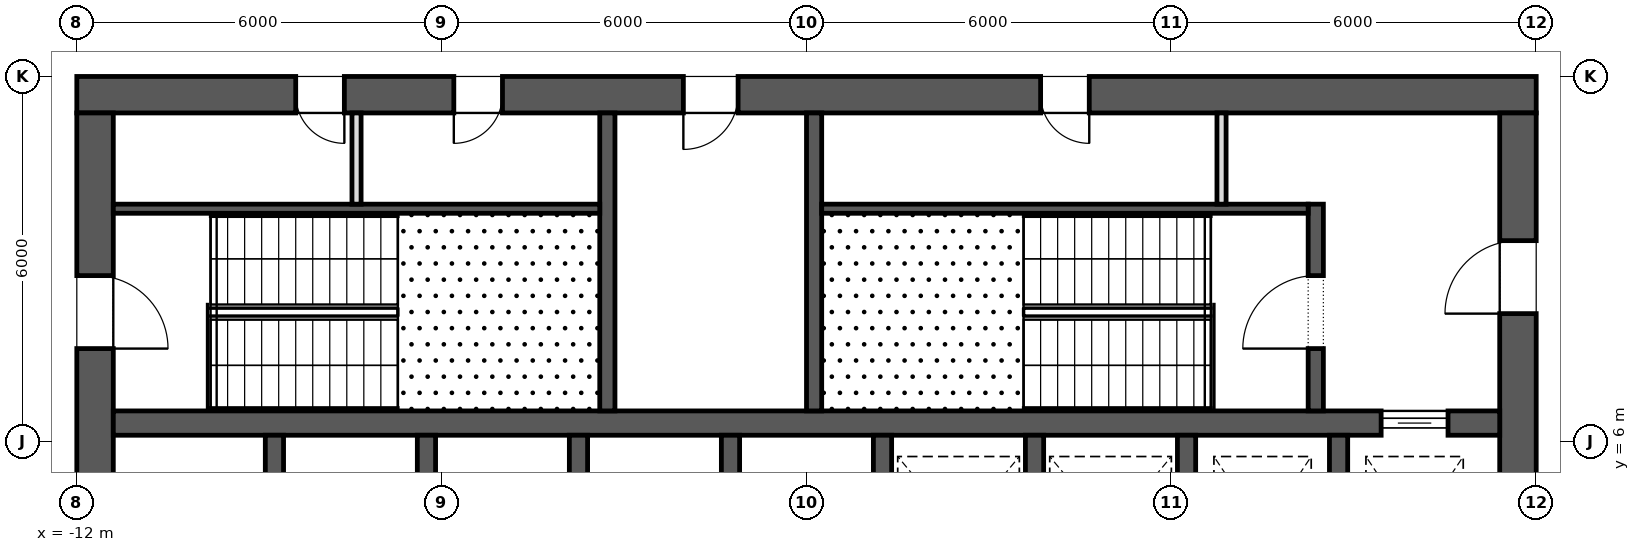
"""IFC4 building model, lengths in metres.
Left out: names, types, materials, properties, quantities, classifications, styles, units other than length and angle.
Written with IfcOpenShell. Run it as: python <this file> out.ifc"""

import sys

from ifc_helpers import new_model, si_unit, direction, frame, frame_2d, origin, place, context, subcontext, project, spatial, rectangle, extrude, element, fill, save


model = new_model("IFC4")
c1 = context("Model", 3, precision=1e-05, world=origin(), true_north=direction((0.0, 1.0)))
c2 = subcontext(c1, "Body", "Model", "MODEL_VIEW")
j1 = project(units=[si_unit("LENGTHUNIT", "METRE"), si_unit("PLANEANGLEUNIT", "RADIAN")], contexts=[c1])
p1 = place(None, origin())
s1 = spatial("IfcSite", under=j1, at=p1, CompositionType="ELEMENT")
p2 = place(p1, origin())
s2 = spatial("IfcBuilding", under=s1, at=p2, CompositionType="ELEMENT")
p3 = place(p2, frame((0.0, 0.0, 27.7)))
s3 = spatial("IfcBuildingStorey", under=s2, at=p3, CompositionType="ELEMENT", Elevation=27.7)
p4 = place(p3, frame((-12.0, 11.7, 0.0), z_axis=(0.0, 0.0, 1.0), x_axis=(1.0, 0.0, 0.0)))
e1 = element("IfcWall", 1, at=p4, inside=s3, PredefinedType="SHEAR", context=c2, shape_type="SweptSolid", body=[
    extrude(rectangle(XDim=24.0, YDim=0.6, at=frame_2d((12.0, 0.0))), origin(), (0.0, 0.0, 1.0), 4.2),
])
p5 = place(p4, frame((9.975, 0.0, 0.0)))
e2 = element("IfcOpeningElement", 2, at=p5, cuts=e1, PredefinedType="OPENING", context=c2, shape_type="SweptSolid", body=[
    extrude(rectangle(XDim=0.9, YDim=2.1, at=frame_2d((0.45, 1.05))), frame((0.0, 0.312, 0.0), z_axis=(0.0, -1.0, 0.0), x_axis=(1.0, 0.0, 0.0)), (0.0, 0.0, 1.0), 0.624),
])
p6 = place(p4, frame((3.6, 0.0, 0.0)))
e3 = element("IfcOpeningElement", 3, at=p6, cuts=e1, PredefinedType="OPENING", context=c2, shape_type="SweptSolid", body=[
    extrude(rectangle(XDim=0.8, YDim=2.1, at=frame_2d((0.4, 1.05))), frame((0.0, 0.312, 0.0), z_axis=(0.0, -1.0, 0.0), x_axis=(1.0, 0.0, 0.0)), (0.0, 0.0, 1.0), 0.624),
])
p7 = place(p4, frame((6.2, 0.0, 0.0)))
e4 = element("IfcOpeningElement", 4, at=p7, cuts=e1, PredefinedType="OPENING", context=c2, shape_type="SweptSolid", body=[
    extrude(rectangle(XDim=0.8, YDim=2.1, at=frame_2d((0.4, 1.05))), frame((0.0, 0.312, 0.0), z_axis=(0.0, -1.0, 0.0), x_axis=(1.0, 0.0, 0.0)), (0.0, 0.0, 1.0), 0.624),
])
p8 = place(p4, frame((15.85, 0.0, 0.0)))
e5 = element("IfcOpeningElement", 5, at=p8, cuts=e1, PredefinedType="OPENING", context=c2, shape_type="SweptSolid", body=[
    extrude(rectangle(XDim=0.8, YDim=2.1, at=frame_2d((0.4, 1.05))), frame((0.0, 0.312, 0.0), z_axis=(0.0, -1.0, 0.0), x_axis=(1.0, 0.0, 0.0)), (0.0, 0.0, 1.0), 0.624),
])
p9 = place(p3, frame((11.7, -11.4, 0.0), z_axis=(0.0, 0.0, 1.0), x_axis=(0.0, 1.0, 0.0)))
e6 = element("IfcWall", 6, at=p9, inside=s3, PredefinedType="SHEAR", context=c2, shape_type="SweptSolid", body=[
    extrude(rectangle(XDim=22.8, YDim=0.6, at=frame_2d((11.4, 0.0))), origin(), (0.0, 0.0, 1.0), 4.2),
])
p10 = place(p9, frame((10.2, 0.0, 0.0)))
e7 = element("IfcOpeningElement", 7, at=p10, cuts=e6, PredefinedType="OPENING", context=c2, shape_type="SweptSolid", body=[
    extrude(rectangle(XDim=2.4, YDim=2.1, at=frame_2d((1.2, 1.05))), frame((0.0, 0.312, 0.0), z_axis=(0.0, -1.0, 0.0), x_axis=(1.0, 0.0, 0.0)), (0.0, 0.0, 1.0), 0.624),
])
p11 = place(p9, frame((19.5, 0.0, 0.0)))
e8 = element("IfcOpeningElement", 8, at=p11, cuts=e6, PredefinedType="OPENING", context=c2, shape_type="SweptSolid", body=[
    extrude(rectangle(XDim=1.2, YDim=2.1, at=frame_2d((0.6, 1.05))), frame((0.0, 0.312, 0.0), z_axis=(0.0, -1.0, 0.0), x_axis=(1.0, 0.0, 0.0)), (0.0, 0.0, 1.0), 0.624),
])
p12 = place(p9, frame((2.1, 0.0, 0.0)))
e9 = element("IfcOpeningElement", 9, at=p12, cuts=e6, PredefinedType="OPENING", context=c2, shape_type="SweptSolid", body=[
    extrude(rectangle(XDim=1.2, YDim=2.1, at=frame_2d((0.6, 1.05))), frame((0.0, 0.312, 0.0), z_axis=(0.0, -1.0, 0.0), x_axis=(1.0, 0.0, 0.0)), (0.0, 0.0, 1.0), 0.624),
])
p13 = place(p3, frame((-11.7, -11.4, 0.0), z_axis=(0.0, 0.0, 1.0), x_axis=(0.0, 1.0, 0.0)))
e10 = element("IfcWall", 10, at=p13, inside=s3, PredefinedType="SHEAR", context=c2, shape_type="SweptSolid", body=[
    extrude(rectangle(XDim=22.8, YDim=0.6, at=frame_2d((11.4, 0.0))), origin(), (0.0, 0.0, 1.0), 4.2),
])
p14 = place(p13, frame((10.2, 0.0, 0.0)))
e11 = element("IfcOpeningElement", 11, at=p14, cuts=e10, PredefinedType="OPENING", context=c2, shape_type="SweptSolid", body=[
    extrude(rectangle(XDim=2.4, YDim=2.1, at=frame_2d((1.2, 1.05))), frame((0.0, 0.312, 0.0), z_axis=(0.0, -1.0, 0.0), x_axis=(1.0, 0.0, 0.0)), (0.0, 0.0, 1.0), 0.624),
])
p15 = place(p13, frame((18.925, 0.0, 0.0)))
e12 = element("IfcOpeningElement", 12, at=p15, cuts=e10, PredefinedType="OPENING", context=c2, shape_type="SweptSolid", body=[
    extrude(rectangle(XDim=1.2, YDim=2.1, at=frame_2d((0.6, 1.05))), frame((0.0, 0.312, 0.0), z_axis=(0.0, -1.0, 0.0), x_axis=(1.0, 0.0, 0.0)), (0.0, 0.0, 1.0), 0.624),
])
p16 = place(p13, frame((2.675, 0.0, 0.0)))
e13 = element("IfcOpeningElement", 13, at=p16, cuts=e10, PredefinedType="OPENING", context=c2, shape_type="SweptSolid", body=[
    extrude(rectangle(XDim=1.2, YDim=2.1, at=frame_2d((0.6, 1.05))), frame((0.0, 0.312, 0.0), z_axis=(0.0, -1.0, 0.0), x_axis=(1.0, 0.0, 0.0)), (0.0, 0.0, 1.0), 0.624),
])
p17 = place(p3, frame((-11.4, 6.3, 0.0), z_axis=(0.0, 0.0, 1.0), x_axis=(1.0, 0.0, 0.0)))
e14 = element("IfcWall", 14, at=p17, inside=s3, PredefinedType="SHEAR", context=c2, shape_type="SweptSolid", body=[
    extrude(rectangle(XDim=22.8, YDim=0.4, at=frame_2d((11.4, 0.0))), origin(), (0.0, 0.0, 1.0), 4.2),
])
p18 = place(p17, frame((20.85, 0.0, 0.0)))
e15 = element("IfcOpeningElement", 15, at=p18, cuts=e14, PredefinedType="OPENING", context=c2, shape_type="SweptSolid", body=[
    extrude(rectangle(XDim=1.1, YDim=2.1, at=frame_2d((0.55, 1.05))), frame((0.0, 0.212, 0.0), z_axis=(0.0, -1.0, 0.0), x_axis=(1.0, 0.0, 0.0)), (0.0, 0.0, 1.0), 0.424),
])
for number, where, z_axis, x_axis in (
    (16, (-8.75, 3.2, 0.0), (0.0, 0.0, 1.0), (0.0, 1.0, 0.0)),
    (17, (-6.25, 3.2, 0.0), (0.0, 0.0, 1.0), (0.0, 1.0, 0.0)),
    (18, (-3.75, 3.2, 0.0), (0.0, 0.0, 1.0), (0.0, 1.0, 0.0)),
    (19, (-1.25, 3.2, 0.0), (0.0, 0.0, 1.0), (0.0, 1.0, 0.0)),
    (20, (1.25, 3.2, 0.0), (0.0, 0.0, 1.0), (0.0, 1.0, 0.0)),
    (21, (3.75, 3.2, 0.0), (0.0, 0.0, 1.0), (0.0, 1.0, 0.0)),
    (22, (6.25, 3.2, 0.0), (0.0, 0.0, 1.0), (0.0, 1.0, 0.0)),
    (23, (8.75, 3.2, 0.0), (0.0, 0.0, 1.0), (0.0, 1.0, 0.0)),
):
    element("IfcWall", number, at=place(p3, frame(where, z_axis=z_axis, x_axis=x_axis)), inside=s3, PredefinedType="SHEAR", context=c2, shape_type="SweptSolid", body=[
        extrude(rectangle(XDim=2.9, YDim=0.3, at=frame_2d((1.45, 0.0))), origin(), (0.0, 0.0, 1.0), 4.2),
    ])
for number, where, z_axis, x_axis in (
    (24, (-3.275, 6.5, 0.0), (0.0, 0.0, 1.0), (0.0, 1.0, 0.0)),
    (25, (0.125, 6.5, 0.0), (0.0, 0.0, 1.0), (0.0, 1.0, 0.0)),
):
    element("IfcWall", number, at=place(p3, frame(where, z_axis=z_axis, x_axis=x_axis)), inside=s3, PredefinedType="SHEAR", context=c2, shape_type="SweptSolid", body=[
        extrude(rectangle(XDim=4.9, YDim=0.25, at=frame_2d((2.45, 0.0))), origin(), (0.0, 0.0, 1.0), 3.9),
    ])
p19 = place(p3, frame((8.375, 6.5, 0.0), z_axis=(0.0, 0.0, 1.0), x_axis=(0.0, 1.0, 0.0)))
e26 = element("IfcWall", 26, at=p19, inside=s3, PredefinedType="SHEAR", context=c2, shape_type="SweptSolid", body=[
    extrude(rectangle(XDim=3.4, YDim=0.25, at=frame_2d((1.7, 0.0))), origin(), (0.0, 0.0, 1.0), 3.9),
])
p20 = place(p19, frame((1.025, 0.0, 0.0)))
e27 = element("IfcOpeningElement", 27, at=p20, cuts=e26, PredefinedType="OPENING", context=c2, shape_type="SweptSolid", body=[
    extrude(rectangle(XDim=1.2, YDim=2.1, at=frame_2d((0.6, 1.05))), frame((0.0, 0.137, 0.0), z_axis=(0.0, -1.0, 0.0), x_axis=(1.0, 0.0, 0.0)), (0.0, 0.0, 1.0), 0.274),
])
for number, where, z_axis, x_axis in (
    (28, (-11.4, 9.825, 0.0), (0.0, 0.0, 1.0), (1.0, 0.0, 0.0)),
    (29, (0.25, 9.825, 0.0), (0.0, 0.0, 1.0), (1.0, 0.0, 0.0)),
):
    element("IfcWall", number, at=place(p3, frame(where, z_axis=z_axis, x_axis=x_axis)), inside=s3, PredefinedType="SHEAR", context=c2, shape_type="SweptSolid", body=[
        extrude(rectangle(XDim=8.0, YDim=0.15, at=frame_2d((4.0, 0.0))), origin(), (0.0, 0.0, 1.0), 3.9),
    ])
for number, where, z_axis, x_axis in (
    (30, (-7.4, 9.9, 0.0), (0.0, 0.0, 1.0), (0.0, 1.0, 0.0)),
    (31, (6.825, 9.9, 0.0), (0.0, 0.0, 1.0), (0.0, 1.0, 0.0)),
):
    element("IfcWall", number, at=place(p3, frame(where, z_axis=z_axis, x_axis=x_axis)), inside=s3, PredefinedType="PARTITIONING", context=c2, shape_type="SweptSolid", body=[
        extrude(rectangle(XDim=1.5, YDim=0.15, at=frame_2d((0.75, 0.0))), origin(), (0.0, 0.0, 1.0), 3.9),
    ])
p21 = place(p18, origin())
e32 = element("IfcDoor", 32, at=p21, inside=s3, OperationType="SLIDING_TO_LEFT", PredefinedType="DOOR", context=c2, shape_type="SweptSolid", body=[
    extrude(rectangle(XDim=1.1, YDim=2.1, at=frame_2d((0.55, 1.05))), frame((0.0, 0.025, 0.0), z_axis=(0.0, -1.0, 0.0), x_axis=(1.0, 0.0, 0.0)), (0.0, 0.0, 1.0), 0.05),
])
fill(e15, e32)
p22 = place(p15, frame((1.2, 0.0, 0.0), z_axis=(0.0, 0.0, 1.0), x_axis=(-1.0, 0.0, 0.0)))
e33 = element("IfcDoor", 33, at=p22, inside=s3, OperationType="SINGLE_SWING_LEFT", PredefinedType="DOOR", context=c2, shape_type="SweptSolid", body=[
    extrude(rectangle(XDim=1.2, YDim=2.1, at=frame_2d((0.6, 1.05))), frame((0.0, 0.025, 0.0), z_axis=(0.0, -1.0, 0.0), x_axis=(1.0, 0.0, 0.0)), (0.0, 0.0, 1.0), 0.05),
])
fill(e12, e33)
p23 = place(p20, origin())
e34 = element("IfcDoor", 34, at=p23, inside=s3, OperationType="SINGLE_SWING_RIGHT", PredefinedType="DOOR", context=c2, shape_type="SweptSolid", body=[
    extrude(rectangle(XDim=1.2, YDim=2.1, at=frame_2d((0.6, 1.05))), frame((0.0, 0.025, 0.0), z_axis=(0.0, -1.0, 0.0), x_axis=(1.0, 0.0, 0.0)), (0.0, 0.0, 1.0), 0.05),
])
fill(e27, e34)
p24 = place(p11, origin())
e35 = element("IfcDoor", 35, at=p24, inside=s3, OperationType="SINGLE_SWING_RIGHT", PredefinedType="DOOR", context=c2, shape_type="SweptSolid", body=[
    extrude(rectangle(XDim=1.2, YDim=2.1, at=frame_2d((0.6, 1.05))), frame((0.0, 0.025, 0.0), z_axis=(0.0, -1.0, 0.0), x_axis=(1.0, 0.0, 0.0)), (0.0, 0.0, 1.0), 0.05),
])
fill(e8, e35)
p25 = place(p5, frame((0.9, 0.0, 0.0), z_axis=(0.0, 0.0, 1.0), x_axis=(-1.0, 0.0, 0.0)))
e36 = element("IfcDoor", 36, at=p25, inside=s3, OperationType="SINGLE_SWING_LEFT", PredefinedType="DOOR", context=c2, shape_type="SweptSolid", body=[
    extrude(rectangle(XDim=0.9, YDim=2.1, at=frame_2d((0.45, 1.05))), frame((0.0, 0.025, 0.0), z_axis=(0.0, -1.0, 0.0), x_axis=(1.0, 0.0, 0.0)), (0.0, 0.0, 1.0), 0.05),
])
fill(e2, e36)
p26 = place(p6, frame((0.8, 0.0, 0.0), z_axis=(0.0, 0.0, 1.0), x_axis=(-1.0, 0.0, 0.0)))
e37 = element("IfcDoor", 37, at=p26, inside=s3, OperationType="SINGLE_SWING_RIGHT", PredefinedType="DOOR", context=c2, shape_type="SweptSolid", body=[
    extrude(rectangle(XDim=0.8, YDim=2.1, at=frame_2d((0.4, 1.05))), frame((0.0, 0.025, 0.0), z_axis=(0.0, -1.0, 0.0), x_axis=(1.0, 0.0, 0.0)), (0.0, 0.0, 1.0), 0.05),
])
fill(e3, e37)
p27 = place(p7, frame((0.8, 0.0, 0.0), z_axis=(0.0, 0.0, 1.0), x_axis=(-1.0, 0.0, 0.0)))
e38 = element("IfcDoor", 38, at=p27, inside=s3, OperationType="SINGLE_SWING_LEFT", PredefinedType="DOOR", context=c2, shape_type="SweptSolid", body=[
    extrude(rectangle(XDim=0.8, YDim=2.1, at=frame_2d((0.4, 1.05))), frame((0.0, 0.025, 0.0), z_axis=(0.0, -1.0, 0.0), x_axis=(1.0, 0.0, 0.0)), (0.0, 0.0, 1.0), 0.05),
])
fill(e4, e38)
p28 = place(p8, frame((0.8, 0.0, 0.0), z_axis=(0.0, 0.0, 1.0), x_axis=(-1.0, 0.0, 0.0)))
e39 = element("IfcDoor", 39, at=p28, inside=s3, OperationType="SINGLE_SWING_RIGHT", PredefinedType="DOOR", context=c2, shape_type="SweptSolid", body=[
    extrude(rectangle(XDim=0.8, YDim=2.1, at=frame_2d((0.4, 1.05))), frame((0.0, 0.025, 0.0), z_axis=(0.0, -1.0, 0.0), x_axis=(1.0, 0.0, 0.0)), (0.0, 0.0, 1.0), 0.05),
])
fill(e5, e39)
save(model, sys.argv[1])
